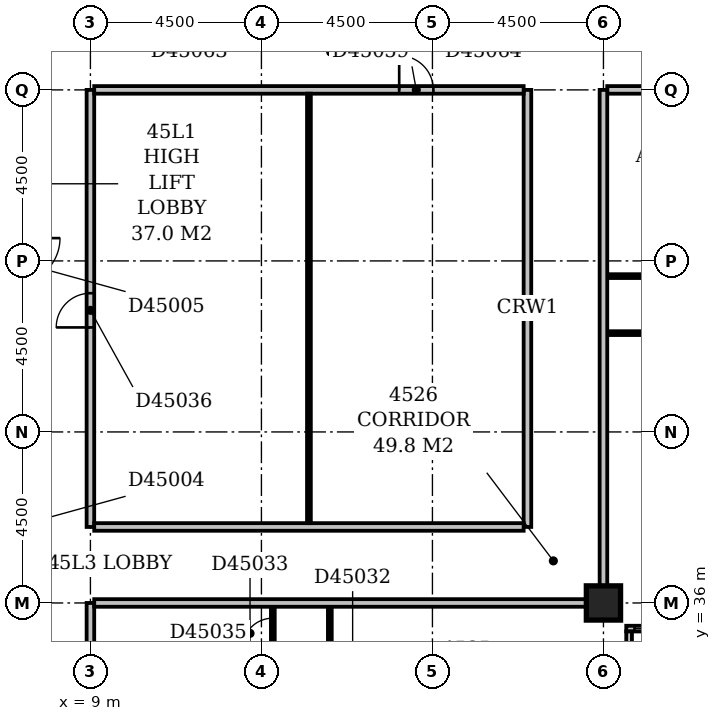
"""IFC4 building model, lengths in metres.
Left out: names, types, materials, properties, quantities, classifications, styles, units other than length and angle.
Written with IfcOpenShell. Run it as: python <this file> out.ifc"""

import sys

from ifc_helpers import new_model, si_unit, direction, frame, frame_2d, origin, origin_2d, place, context, subcontext, project, spatial, rectangle, extrude, element, fill, save


model = new_model("IFC4")
c1 = context("Model", 3, precision=1e-05, world=origin(), true_north=direction((0.0, 1.0)))
c2 = subcontext(c1, "Body", "Model", "MODEL_VIEW")
j1 = project(units=[si_unit("LENGTHUNIT", "METRE"), si_unit("PLANEANGLEUNIT", "RADIAN")], contexts=[c1])
p1 = place(None, origin())
s1 = spatial("IfcSite", under=j1, at=p1, CompositionType="ELEMENT")
p2 = place(p1, origin())
s2 = spatial("IfcBuilding", under=s1, at=p2, CompositionType="ELEMENT")
p3 = place(p2, frame((0.0, 0.0, 179.0)))
s3 = spatial("IfcBuildingStorey", under=s2, at=p3, CompositionType="ELEMENT", Elevation=179.0)
p4 = place(p3, frame((22.5, 36.0, -0.3), z_axis=(0.0, 0.0, 1.0), x_axis=(1.0, 0.0, 0.0)))
e1 = element("IfcColumn", 1, at=p4, inside=s3, PredefinedType="COLUMN", context=c2, shape_type="SweptSolid", body=[
    extrude(rectangle(XDim=0.9, YDim=0.9, at=origin_2d()), origin(), (0.0, 0.0, 1.0), 3.6),
])
p5 = place(p3, frame((23.175, 17.4, 0.0), z_axis=(0.0, 0.0, 1.0), x_axis=(0.0, 1.0, 0.0)))
e2 = element("IfcWall", 2, at=p5, inside=s3, PredefinedType="STANDARD", context=c2, shape_type="SweptSolid", body=[
    extrude(rectangle(XDim=17.85, YDim=0.15, at=frame_2d((8.925, 0.0))), origin(), (0.0, 0.0, 1.0), 2.7),
])
p6 = place(p5, frame((1.257, 0.0, 0.6)))
e3 = element("IfcOpeningElement", 3, at=p6, cuts=e2, PredefinedType="OPENING", context=c2, shape_type="SweptSolid", body=[
    extrude(rectangle(XDim=2.1, YDim=1.8, at=frame_2d((1.05, 0.9))), frame((0.0, 0.087, 0.0), z_axis=(0.0, -1.0, 0.0), x_axis=(1.0, 0.0, 0.0)), (0.0, 0.0, 1.0), 0.174),
])
p7 = place(p5, frame((6.15, 0.0, 0.6)))
e4 = element("IfcOpeningElement", 4, at=p7, cuts=e2, PredefinedType="OPENING", context=c2, shape_type="SweptSolid", body=[
    extrude(rectangle(XDim=2.4, YDim=1.8, at=frame_2d((1.2, 0.9))), frame((0.0, 0.087, 0.0), z_axis=(0.0, -1.0, 0.0), x_axis=(1.0, 0.0, 0.0)), (0.0, 0.0, 1.0), 0.174),
])
p8 = place(p5, frame((10.65, 0.0, 0.6)))
e5 = element("IfcOpeningElement", 5, at=p8, cuts=e2, PredefinedType="OPENING", context=c2, shape_type="SweptSolid", body=[
    extrude(rectangle(XDim=2.4, YDim=1.8, at=frame_2d((1.2, 0.9))), frame((0.0, 0.087, 0.0), z_axis=(0.0, -1.0, 0.0), x_axis=(1.0, 0.0, 0.0)), (0.0, 0.0, 1.0), 0.174),
])
p9 = place(p5, frame((15.15, 0.0, 0.6)))
e6 = element("IfcOpeningElement", 6, at=p9, cuts=e2, PredefinedType="OPENING", context=c2, shape_type="SweptSolid", body=[
    extrude(rectangle(XDim=2.4, YDim=1.8, at=frame_2d((1.2, 0.9))), frame((0.0, 0.087, 0.0), z_axis=(0.0, -1.0, 0.0), x_axis=(1.0, 0.0, 0.0)), (0.0, 0.0, 1.0), 0.174),
])
p10 = place(p3, frame((23.1, 35.325, 0.0), z_axis=(0.0, 0.0, 1.0), x_axis=(1.0, 0.0, 0.0)))
e7 = element("IfcWall", 7, at=p10, inside=s3, PredefinedType="STANDARD", context=c2, shape_type="SweptSolid", body=[
    extrude(rectangle(XDim=45.15, YDim=0.15, at=frame_2d((22.575, 0.0))), origin(), (0.0, 0.0, 1.0), 2.7),
])
p11 = place(p10, frame((0.217, 0.0, 0.6)))
e8 = element("IfcOpeningElement", 8, at=p11, cuts=e7, PredefinedType="OPENING", context=c2, shape_type="SweptSolid", body=[
    extrude(rectangle(XDim=2.1, YDim=1.8, at=frame_2d((1.05, 0.9))), frame((0.0, 0.087, 0.0), z_axis=(0.0, -1.0, 0.0), x_axis=(1.0, 0.0, 0.0)), (0.0, 0.0, 1.0), 0.174),
])
p12 = place(p10, frame((4.95, 0.0, 0.6)))
e9 = element("IfcOpeningElement", 9, at=p12, cuts=e7, PredefinedType="OPENING", context=c2, shape_type="SweptSolid", body=[
    extrude(rectangle(XDim=2.4, YDim=1.8, at=frame_2d((1.2, 0.9))), frame((0.0, 0.087, 0.0), z_axis=(0.0, -1.0, 0.0), x_axis=(1.0, 0.0, 0.0)), (0.0, 0.0, 1.0), 0.174),
])
p13 = place(p10, frame((9.45, 0.0, 0.6)))
e10 = element("IfcOpeningElement", 10, at=p13, cuts=e7, PredefinedType="OPENING", context=c2, shape_type="SweptSolid", body=[
    extrude(rectangle(XDim=2.4, YDim=1.8, at=frame_2d((1.2, 0.9))), frame((0.0, 0.087, 0.0), z_axis=(0.0, -1.0, 0.0), x_axis=(1.0, 0.0, 0.0)), (0.0, 0.0, 1.0), 0.174),
])
p14 = place(p10, frame((13.95, 0.0, 0.6)))
e11 = element("IfcOpeningElement", 11, at=p14, cuts=e7, PredefinedType="OPENING", context=c2, shape_type="SweptSolid", body=[
    extrude(rectangle(XDim=2.4, YDim=1.8, at=frame_2d((1.2, 0.9))), frame((0.0, 0.087, 0.0), z_axis=(0.0, -1.0, 0.0), x_axis=(1.0, 0.0, 0.0)), (0.0, 0.0, 1.0), 0.174),
])
p15 = place(p10, frame((18.45, 0.0, 0.6)))
e12 = element("IfcOpeningElement", 12, at=p15, cuts=e7, PredefinedType="OPENING", context=c2, shape_type="SweptSolid", body=[
    extrude(rectangle(XDim=2.4, YDim=1.8, at=frame_2d((1.2, 0.9))), frame((0.0, 0.087, 0.0), z_axis=(0.0, -1.0, 0.0), x_axis=(1.0, 0.0, 0.0)), (0.0, 0.0, 1.0), 0.174),
])
p16 = place(p10, frame((24.403, 0.0, 0.6)))
e13 = element("IfcOpeningElement", 13, at=p16, cuts=e7, PredefinedType="OPENING", context=c2, shape_type="SweptSolid", body=[
    extrude(rectangle(XDim=1.2, YDim=1.8, at=frame_2d((0.6, 0.9))), frame((0.0, 0.087, 0.0), z_axis=(0.0, -1.0, 0.0), x_axis=(1.0, 0.0, 0.0)), (0.0, 0.0, 1.0), 0.174),
])
p17 = place(p10, frame((27.141, 0.0, 0.6)))
e14 = element("IfcOpeningElement", 14, at=p17, cuts=e7, PredefinedType="OPENING", context=c2, shape_type="SweptSolid", body=[
    extrude(rectangle(XDim=2.1, YDim=1.8, at=frame_2d((1.05, 0.9))), frame((0.0, 0.087, 0.0), z_axis=(0.0, -1.0, 0.0), x_axis=(1.0, 0.0, 0.0)), (0.0, 0.0, 1.0), 0.174),
])
p18 = place(p10, frame((31.95, 0.0, 0.6)))
e15 = element("IfcOpeningElement", 15, at=p18, cuts=e7, PredefinedType="OPENING", context=c2, shape_type="SweptSolid", body=[
    extrude(rectangle(XDim=2.4, YDim=1.8, at=frame_2d((1.2, 0.9))), frame((0.0, 0.087, 0.0), z_axis=(0.0, -1.0, 0.0), x_axis=(1.0, 0.0, 0.0)), (0.0, 0.0, 1.0), 0.174),
])
p19 = place(p10, frame((36.45, 0.0, 0.6)))
e16 = element("IfcOpeningElement", 16, at=p19, cuts=e7, PredefinedType="OPENING", context=c2, shape_type="SweptSolid", body=[
    extrude(rectangle(XDim=2.4, YDim=1.8, at=frame_2d((1.2, 0.9))), frame((0.0, 0.087, 0.0), z_axis=(0.0, -1.0, 0.0), x_axis=(1.0, 0.0, 0.0)), (0.0, 0.0, 1.0), 0.174),
])
p20 = place(p10, frame((40.95, 0.0, 0.6)))
e17 = element("IfcOpeningElement", 17, at=p20, cuts=e7, PredefinedType="OPENING", context=c2, shape_type="SweptSolid", body=[
    extrude(rectangle(XDim=2.4, YDim=1.8, at=frame_2d((1.2, 0.9))), frame((0.0, 0.087, 0.0), z_axis=(0.0, -1.0, 0.0), x_axis=(1.0, 0.0, 0.0)), (0.0, 0.0, 1.0), 0.174),
])
p21 = place(p3, frame((9.0, 5.0, 0.0), z_axis=(0.0, 0.0, 1.0), x_axis=(0.0, 1.0, 0.0)))
e18 = element("IfcWall", 18, at=p21, inside=s3, PredefinedType="PARTITIONING", context=c2, shape_type="SweptSolid", body=[
    extrude(rectangle(XDim=31.0, YDim=0.2, at=frame_2d((15.5, 0.0))), origin(), (0.0, 0.0, 1.0), 3.3),
])
p22 = place(p21, frame((17.8, 0.0, 0.0)))
e19 = element("IfcOpeningElement", 19, at=p22, cuts=e18, PredefinedType="OPENING", context=c2, shape_type="SweptSolid", body=[
    extrude(rectangle(XDim=1.0, YDim=2.1, at=frame_2d((0.5, 1.05))), frame((0.0, 0.112, 0.0), z_axis=(0.0, -1.0, 0.0), x_axis=(1.0, 0.0, 0.0)), (0.0, 0.0, 1.0), 0.224),
])
p23 = place(p21, frame((14.95, 0.0, 0.0)))
e20 = element("IfcOpeningElement", 20, at=p23, cuts=e18, PredefinedType="OPENING", context=c2, shape_type="SweptSolid", body=[
    extrude(rectangle(XDim=1.0, YDim=2.1, at=frame_2d((0.5, 1.05))), frame((0.0, 0.112, 0.0), z_axis=(0.0, -1.0, 0.0), x_axis=(1.0, 0.0, 0.0)), (0.0, 0.0, 1.0), 0.224),
])
p24 = place(p21, frame((9.3, 0.0, 0.0)))
e21 = element("IfcOpeningElement", 21, at=p24, cuts=e18, PredefinedType="OPENING", context=c2, shape_type="SweptSolid", body=[
    extrude(rectangle(XDim=1.0, YDim=2.1, at=frame_2d((0.5, 1.05))), frame((0.0, 0.112, 0.0), z_axis=(0.0, -1.0, 0.0), x_axis=(1.0, 0.0, 0.0)), (0.0, 0.0, 1.0), 0.224),
])
p25 = place(p21, frame((1.5, 0.0, 0.0)))
e22 = element("IfcOpeningElement", 22, at=p25, cuts=e18, PredefinedType="OPENING", context=c2, shape_type="SweptSolid", body=[
    extrude(rectangle(XDim=0.9, YDim=2.1, at=frame_2d((0.45, 1.05))), frame((0.0, 0.112, 0.0), z_axis=(0.0, -1.0, 0.0), x_axis=(1.0, 0.0, 0.0)), (0.0, 0.0, 1.0), 0.224),
])
p26 = place(p3, frame((15.3, 22.6, 0.0), z_axis=(0.0, 0.0, 1.0), x_axis=(0.0, 1.0, 0.0)))
e23 = element("IfcWall", 23, at=p26, inside=s3, PredefinedType="PARTITIONING", context=c2, shape_type="SweptSolid", body=[
    extrude(rectangle(XDim=13.3, YDim=0.1, at=frame_2d((6.65, 0.0))), origin(), (0.0, 0.0, 1.0), 3.3),
])
p27 = place(p26, frame((1.7, 0.0, 0.0)))
e24 = element("IfcOpeningElement", 24, at=p27, cuts=e23, PredefinedType="OPENING", context=c2, shape_type="SweptSolid", body=[
    extrude(rectangle(XDim=0.9, YDim=2.1, at=frame_2d((0.45, 1.05))), frame((0.0, 0.062, 0.0), z_axis=(0.0, -1.0, 0.0), x_axis=(1.0, 0.0, 0.0)), (0.0, 0.0, 1.0), 0.124),
])
p28 = place(p26, frame((6.2, 0.0, 0.0)))
e25 = element("IfcOpeningElement", 25, at=p28, cuts=e23, PredefinedType="OPENING", context=c2, shape_type="SweptSolid", body=[
    extrude(rectangle(XDim=0.9, YDim=2.1, at=frame_2d((0.45, 1.05))), frame((0.0, 0.062, 0.0), z_axis=(0.0, -1.0, 0.0), x_axis=(1.0, 0.0, 0.0)), (0.0, 0.0, 1.0), 0.124),
])
p29 = place(p26, frame((10.7, 0.0, 0.0)))
e26 = element("IfcOpeningElement", 26, at=p29, cuts=e23, PredefinedType="OPENING", context=c2, shape_type="SweptSolid", body=[
    extrude(rectangle(XDim=0.9, YDim=2.1, at=frame_2d((0.45, 1.05))), frame((0.0, 0.062, 0.0), z_axis=(0.0, -1.0, 0.0), x_axis=(1.0, 0.0, 0.0)), (0.0, 0.0, 1.0), 0.124),
])
p30 = place(p3, frame((13.8, 24.1, 0.0), z_axis=(0.0, 0.0, 1.0), x_axis=(0.0, 1.0, 0.0)))
e27 = element("IfcWall", 27, at=p30, inside=s3, PredefinedType="PARTITIONING", context=c2, shape_type="SweptSolid", body=[
    extrude(rectangle(XDim=11.8, YDim=0.1, at=frame_2d((5.9, 0.0))), origin(), (0.0, 0.0, 1.0), 3.3),
])
p31 = place(p30, frame((8.7, 0.0, 0.0)))
e28 = element("IfcOpeningElement", 28, at=p31, cuts=e27, PredefinedType="OPENING", context=c2, shape_type="SweptSolid", body=[
    extrude(rectangle(XDim=0.8, YDim=2.1, at=frame_2d((0.4, 1.05))), frame((0.0, 0.062, 0.0), z_axis=(0.0, -1.0, 0.0), x_axis=(1.0, 0.0, 0.0)), (0.0, 0.0, 1.0), 0.124),
])
p32 = place(p30, frame((3.5, 0.0, 0.0)))
e29 = element("IfcOpeningElement", 29, at=p32, cuts=e27, PredefinedType="OPENING", context=c2, shape_type="SweptSolid", body=[
    extrude(rectangle(XDim=0.9, YDim=2.1, at=frame_2d((0.45, 1.05))), frame((0.0, 0.062, 0.0), z_axis=(0.0, -1.0, 0.0), x_axis=(1.0, 0.0, 0.0)), (0.0, 0.0, 1.0), 0.124),
])
p33 = place(p30, frame((10.7, 0.0, 0.0)))
e30 = element("IfcOpeningElement", 30, at=p33, cuts=e27, PredefinedType="OPENING", context=c2, shape_type="SweptSolid", body=[
    extrude(rectangle(XDim=0.8, YDim=2.1, at=frame_2d((0.4, 1.05))), frame((0.0, 0.062, 0.0), z_axis=(0.0, -1.0, 0.0), x_axis=(1.0, 0.0, 0.0)), (0.0, 0.0, 1.0), 0.124),
])
p34 = place(p3, frame((9.1, 36.0, 0.0), z_axis=(0.0, 0.0, 1.0), x_axis=(1.0, 0.0, 0.0)))
e31 = element("IfcWall", 31, at=p34, inside=s3, PredefinedType="PARTITIONING", context=c2, shape_type="SweptSolid", body=[
    extrude(rectangle(XDim=12.95, YDim=0.2, at=frame_2d((6.475, 0.0))), origin(), (0.0, 0.0, 1.0), 3.3),
])
p35 = place(p3, frame((22.5, 36.45, 0.0), z_axis=(0.0, 0.0, 1.0), x_axis=(0.0, 1.0, 0.0)))
e32 = element("IfcWall", 32, at=p35, inside=s3, PredefinedType="PARTITIONING", context=c2, shape_type="SweptSolid", body=[
    extrude(rectangle(XDim=13.05, YDim=0.2, at=frame_2d((6.525, 0.0))), origin(), (0.0, 0.0, 1.0), 3.3),
])
p36 = place(p3, frame((9.0, 38.0, 0.0), z_axis=(0.0, 0.0, 1.0), x_axis=(0.0, 1.0, 0.0)))
e33 = element("IfcWall", 33, at=p36, inside=s3, PredefinedType="PARTITIONING", context=c2, shape_type="SweptSolid", body=[
    extrude(rectangle(XDim=11.5, YDim=0.2, at=frame_2d((5.75, 0.0))), origin(), (0.0, 0.0, 1.0), 3.3),
])
p37 = place(p36, frame((5.25, 0.0, 0.0)))
e34 = element("IfcOpeningElement", 34, at=p37, cuts=e33, PredefinedType="OPENING", context=c2, shape_type="SweptSolid", body=[
    extrude(rectangle(XDim=0.9, YDim=2.1, at=frame_2d((0.45, 1.05))), frame((0.0, 0.112, 0.0), z_axis=(0.0, -1.0, 0.0), x_axis=(1.0, 0.0, 0.0)), (0.0, 0.0, 1.0), 0.224),
])
p38 = place(p3, frame((9.1, 38.0, 0.0), z_axis=(0.0, 0.0, 1.0), x_axis=(1.0, 0.0, 0.0)))
e35 = element("IfcWall", 35, at=p38, inside=s3, PredefinedType="PARTITIONING", context=c2, shape_type="SweptSolid", body=[
    extrude(rectangle(XDim=11.3, YDim=0.2, at=frame_2d((5.65, 0.0))), origin(), (0.0, 0.0, 1.0), 3.3),
])
p39 = place(p3, frame((20.5, 38.0, 0.0), z_axis=(0.0, 0.0, 1.0), x_axis=(0.0, 1.0, 0.0)))
e36 = element("IfcWall", 36, at=p39, inside=s3, PredefinedType="PARTITIONING", context=c2, shape_type="SweptSolid", body=[
    extrude(rectangle(XDim=11.5, YDim=0.2, at=frame_2d((5.75, 0.0))), origin(), (0.0, 0.0, 1.0), 3.3),
])
p40 = place(p3, frame((14.75, 38.1, 0.0), z_axis=(0.0, 0.0, 1.0), x_axis=(0.0, 1.0, 0.0)))
e37 = element("IfcWall", 37, at=p40, inside=s3, PredefinedType="PARTITIONING", context=c2, shape_type="SweptSolid", body=[
    extrude(rectangle(XDim=11.3, YDim=0.1, at=frame_2d((5.65, 0.0))), origin(), (0.0, 0.0, 1.0), 3.3),
])
p41 = place(p3, frame((22.6, 43.1, 0.0), z_axis=(0.0, 0.0, 1.0), x_axis=(1.0, 0.0, 0.0)))
e38 = element("IfcWall", 38, at=p41, inside=s3, PredefinedType="PARTITIONING", context=c2, shape_type="SweptSolid", body=[
    extrude(rectangle(XDim=17.8, YDim=0.1, at=frame_2d((8.9, 0.0))), origin(), (0.0, 0.0, 1.0), 3.3),
])
p42 = place(p41, frame((3.9, 0.0, 0.0)))
e39 = element("IfcOpeningElement", 39, at=p42, cuts=e38, PredefinedType="OPENING", context=c2, shape_type="SweptSolid", body=[
    extrude(rectangle(XDim=0.9, YDim=2.1, at=frame_2d((0.45, 1.05))), frame((0.0, 0.062, 0.0), z_axis=(0.0, -1.0, 0.0), x_axis=(1.0, 0.0, 0.0)), (0.0, 0.0, 1.0), 0.124),
])
p43 = place(p41, frame((10.7, 0.0, 0.0)))
e40 = element("IfcOpeningElement", 40, at=p43, cuts=e38, PredefinedType="OPENING", context=c2, shape_type="SweptSolid", body=[
    extrude(rectangle(XDim=0.9, YDim=2.1, at=frame_2d((0.45, 1.05))), frame((0.0, 0.062, 0.0), z_axis=(0.0, -1.0, 0.0), x_axis=(1.0, 0.0, 0.0)), (0.0, 0.0, 1.0), 0.124),
])
p44 = place(p41, frame((14.05, 0.0, 0.0)))
e41 = element("IfcOpeningElement", 41, at=p44, cuts=e38, PredefinedType="OPENING", context=c2, shape_type="SweptSolid", body=[
    extrude(rectangle(XDim=0.9, YDim=2.1, at=frame_2d((0.45, 1.05))), frame((0.0, 0.062, 0.0), z_axis=(0.0, -1.0, 0.0), x_axis=(1.0, 0.0, 0.0)), (0.0, 0.0, 1.0), 0.124),
])
p45 = place(p3, frame((22.6, 44.6, 0.0), z_axis=(0.0, 0.0, 1.0), x_axis=(1.0, 0.0, 0.0)))
e42 = element("IfcWall", 42, at=p45, inside=s3, PredefinedType="PARTITIONING", context=c2, shape_type="SweptSolid", body=[
    extrude(rectangle(XDim=6.75, YDim=0.1, at=frame_2d((3.375, 0.0))), origin(), (0.0, 0.0, 1.0), 3.3),
])
p46 = place(p45, frame((2.9, 0.0, 0.0)))
e43 = element("IfcOpeningElement", 43, at=p46, cuts=e42, PredefinedType="OPENING", context=c2, shape_type="SweptSolid", body=[
    extrude(rectangle(XDim=0.9, YDim=2.1, at=frame_2d((0.45, 1.05))), frame((0.0, 0.062, 0.0), z_axis=(0.0, -1.0, 0.0), x_axis=(1.0, 0.0, 0.0)), (0.0, 0.0, 1.0), 0.124),
])
p47 = place(p3, frame((9.1, 49.5, 0.0), z_axis=(0.0, 0.0, 1.0), x_axis=(1.0, 0.0, 0.0)))
e44 = element("IfcWall", 44, at=p47, inside=s3, PredefinedType="PARTITIONING", context=c2, shape_type="SweptSolid", body=[
    extrude(rectangle(XDim=11.3, YDim=0.2, at=frame_2d((5.65, 0.0))), origin(), (0.0, 0.0, 1.0), 3.3),
])
p48 = place(p47, frame((8.025, 0.0, 0.0)))
e45 = element("IfcOpeningElement", 45, at=p48, cuts=e44, PredefinedType="OPENING", context=c2, shape_type="SweptSolid", body=[
    extrude(rectangle(XDim=0.9, YDim=2.1, at=frame_2d((0.45, 1.05))), frame((0.0, 0.112, 0.0), z_axis=(0.0, -1.0, 0.0), x_axis=(1.0, 0.0, 0.0)), (0.0, 0.0, 1.0), 0.224),
])
p49 = place(p3, frame((22.6, 49.5, 0.0), z_axis=(0.0, 0.0, 1.0), x_axis=(1.0, 0.0, 0.0)))
e46 = element("IfcWall", 46, at=p49, inside=s3, PredefinedType="PARTITIONING", context=c2, shape_type="SweptSolid", body=[
    extrude(rectangle(XDim=44.45, YDim=0.2, at=frame_2d((22.225, 0.0))), origin(), (0.0, 0.0, 1.0), 3.3),
])
p50 = place(p49, frame((7.1, 0.0, 0.0)))
e47 = element("IfcOpeningElement", 47, at=p50, cuts=e46, PredefinedType="OPENING", context=c2, shape_type="SweptSolid", body=[
    extrude(rectangle(XDim=1.0, YDim=2.1, at=frame_2d((0.5, 1.05))), frame((0.0, 0.112, 0.0), z_axis=(0.0, -1.0, 0.0), x_axis=(1.0, 0.0, 0.0)), (0.0, 0.0, 1.0), 0.224),
])
p51 = place(p49, frame((26.1, 0.0, 0.0)))
e48 = element("IfcOpeningElement", 48, at=p51, cuts=e46, PredefinedType="OPENING", context=c2, shape_type="SweptSolid", body=[
    extrude(rectangle(XDim=1.0, YDim=2.1, at=frame_2d((0.5, 1.05))), frame((0.0, 0.112, 0.0), z_axis=(0.0, -1.0, 0.0), x_axis=(1.0, 0.0, 0.0)), (0.0, 0.0, 1.0), 0.224),
])
p52 = place(p49, frame((31.7, 0.0, 0.0)))
e49 = element("IfcOpeningElement", 49, at=p52, cuts=e46, PredefinedType="OPENING", context=c2, shape_type="SweptSolid", body=[
    extrude(rectangle(XDim=1.0, YDim=2.1, at=frame_2d((0.5, 1.05))), frame((0.0, 0.112, 0.0), z_axis=(0.0, -1.0, 0.0), x_axis=(1.0, 0.0, 0.0)), (0.0, 0.0, 1.0), 0.224),
])
p53 = place(p11, origin())
e50 = element("IfcWindow", 50, at=p53, inside=s3, PartitioningType="SINGLE_PANEL", PredefinedType="WINDOW", context=c2, shape_type="SweptSolid", body=[
    extrude(rectangle(XDim=2.1, YDim=1.8, at=frame_2d((1.05, 0.9))), frame((0.0, 0.03, 0.0), z_axis=(0.0, -1.0, 0.0), x_axis=(1.0, 0.0, 0.0)), (0.0, 0.0, 1.0), 0.06),
])
fill(e8, e50)
p54 = place(p33, origin())
e51 = element("IfcDoor", 51, at=p54, inside=s3, OperationType="SINGLE_SWING_LEFT", PredefinedType="DOOR", context=c2, shape_type="SweptSolid", body=[
    extrude(rectangle(XDim=0.8, YDim=2.1, at=frame_2d((0.4, 1.05))), frame((0.0, 0.025, 0.0), z_axis=(0.0, -1.0, 0.0), x_axis=(1.0, 0.0, 0.0)), (0.0, 0.0, 1.0), 0.05),
])
fill(e30, e51)
p55 = place(p37, origin())
e52 = element("IfcDoor", 52, at=p55, inside=s3, OperationType="SINGLE_SWING_LEFT", PredefinedType="DOOR", context=c2, shape_type="SweptSolid", body=[
    extrude(rectangle(XDim=0.9, YDim=2.1, at=frame_2d((0.45, 1.05))), frame((0.0, 0.025, 0.0), z_axis=(0.0, -1.0, 0.0), x_axis=(1.0, 0.0, 0.0)), (0.0, 0.0, 1.0), 0.05),
])
fill(e34, e52)
p56 = place(p48, origin())
e53 = element("IfcDoor", 53, at=p56, inside=s3, OperationType="SINGLE_SWING_LEFT", PredefinedType="DOOR", context=c2, shape_type="SweptSolid", body=[
    extrude(rectangle(XDim=0.9, YDim=2.1, at=frame_2d((0.45, 1.05))), frame((0.0, 0.025, 0.0), z_axis=(0.0, -1.0, 0.0), x_axis=(1.0, 0.0, 0.0)), (0.0, 0.0, 1.0), 0.05),
])
fill(e45, e53)
save(model, sys.argv[1])
